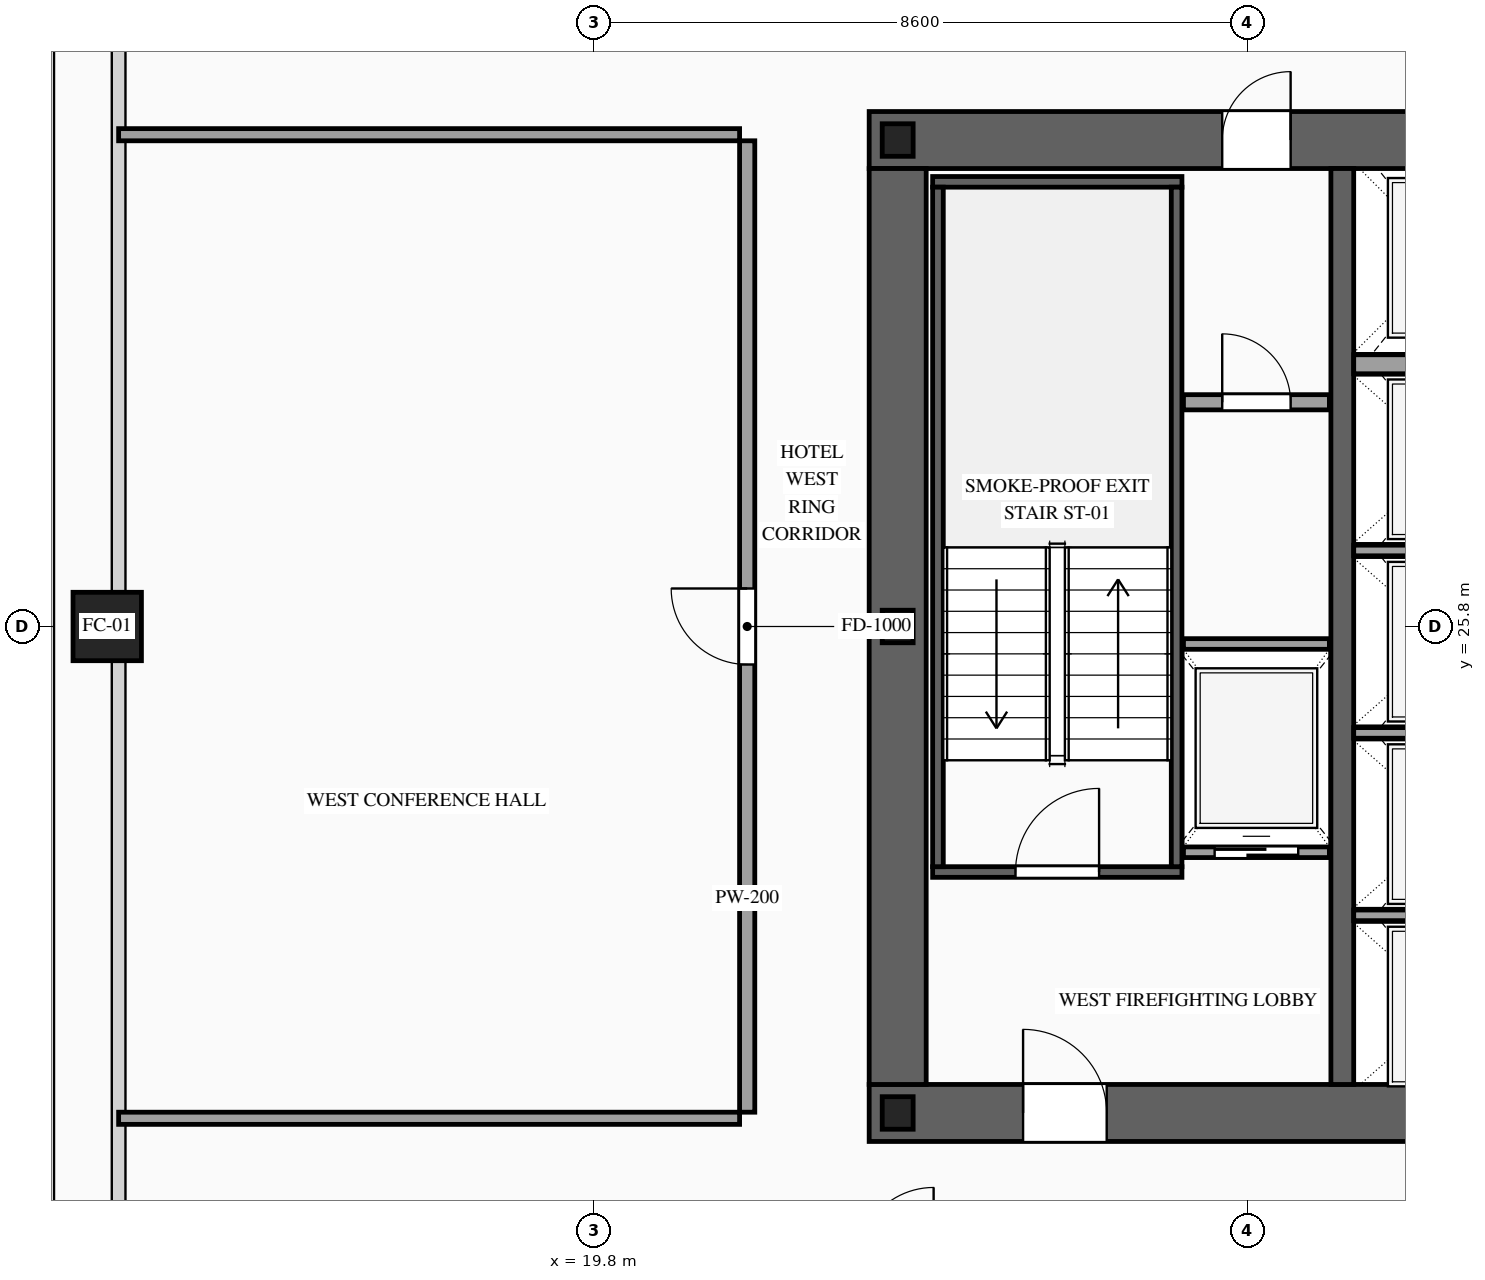
"""IFC4 building model, lengths in metres.
Left out: names, types, materials, properties, quantities, classifications, styles, units other than length and angle.
Written with IfcOpenShell. Run it as: python <this file> out.ifc"""

import sys

from ifc_helpers import new_model, si_unit, direction, frame, frame_2d, origin, origin_2d, place, context, subcontext, project, spatial, rectangle, hollow_rectangle, i_section, extrude, source, transform, mapped, element, fill, save


model = new_model("IFC4")
c1 = context("Model", 3, precision=1e-05, world=origin(), true_north=direction((0.0, 1.0)))
c2 = subcontext(c1, "Body", "Model", "MODEL_VIEW")
j1 = project(units=[si_unit("LENGTHUNIT", "METRE"), si_unit("PLANEANGLEUNIT", "RADIAN")], contexts=[c1])
p1 = place(None, origin())
s1 = spatial("IfcSite", under=j1, at=p1, CompositionType="ELEMENT")
p2 = place(p1, origin())
s2 = spatial("IfcBuilding", under=s1, at=p2, CompositionType="ELEMENT")
p3 = place(p2, frame((0.0, 0.0, 119.0)))
s3 = spatial("IfcBuildingStorey", under=s2, at=p3, CompositionType="ELEMENT", Elevation=119.0)
p4 = place(p3, frame((23.425, 19.4, 0.0), z_axis=(0.0, 0.0, 1.0), x_axis=(1.0, 0.0, 0.0)))
e1 = element("IfcWall", 1, at=p4, inside=s3, PredefinedType="SHEAR", context=c2, shape_type="SweptSolid", body=[
    extrude(rectangle(XDim=27.15, YDim=0.75, at=frame_2d((13.575, 0.0))), origin(), (0.0, 0.0, 1.0), 3.6),
])
p5 = place(p4, frame((2.025, 0.0, 0.0)))
e2 = element("IfcOpeningElement", 2, at=p5, cuts=e1, PredefinedType="OPENING", context=c2, shape_type="SweptSolid", body=[
    extrude(rectangle(XDim=1.1, YDim=2.2, at=frame_2d((0.55, 1.1))), frame((0.0, 0.39, 0.0), z_axis=(0.0, -1.0, 0.0), x_axis=(1.0, 0.0, 0.0)), (0.0, 0.0, 1.0), 0.78),
])
p6 = place(p4, frame((9.925, 0.0, 0.0)))
e3 = element("IfcOpeningElement", 3, at=p6, cuts=e1, PredefinedType="OPENING", context=c2, shape_type="SweptSolid", body=[
    extrude(rectangle(XDim=1.1, YDim=2.2, at=frame_2d((0.55, 1.1))), frame((0.0, 0.39, 0.0), z_axis=(0.0, -1.0, 0.0), x_axis=(1.0, 0.0, 0.0)), (0.0, 0.0, 1.0), 0.78),
])
p7 = place(p4, frame((23.125, 0.0, 0.0)))
e4 = element("IfcOpeningElement", 4, at=p7, cuts=e1, PredefinedType="OPENING", context=c2, shape_type="SweptSolid", body=[
    extrude(rectangle(XDim=1.1, YDim=2.2, at=frame_2d((0.55, 1.1))), frame((0.0, 0.39, 0.0), z_axis=(0.0, -1.0, 0.0), x_axis=(1.0, 0.0, 0.0)), (0.0, 0.0, 1.0), 0.78),
])
p8 = place(p4, frame((19.745, 0.0, 0.0)))
e5 = element("IfcOpeningElement", 5, at=p8, cuts=e1, PredefinedType="OPENING", context=c2, shape_type="SweptSolid", body=[
    extrude(rectangle(XDim=0.9, YDim=2.15, at=frame_2d((0.45, 1.075))), frame((0.0, 0.39, 0.0), z_axis=(0.0, -1.0, 0.0), x_axis=(1.0, 0.0, 0.0)), (0.0, 0.0, 1.0), 0.78),
])
p9 = place(p4, frame((18.305, 0.0, 0.0)))
e6 = element("IfcOpeningElement", 6, at=p9, cuts=e1, PredefinedType="OPENING", context=c2, shape_type="SweptSolid", body=[
    extrude(rectangle(XDim=0.9, YDim=2.15, at=frame_2d((0.45, 1.075))), frame((0.0, 0.39, 0.0), z_axis=(0.0, -1.0, 0.0), x_axis=(1.0, 0.0, 0.0)), (0.0, 0.0, 1.0), 0.78),
])
p10 = place(p3, frame((23.425, 32.2, 0.0), z_axis=(0.0, 0.0, 1.0), x_axis=(1.0, 0.0, 0.0)))
e7 = element("IfcWall", 7, at=p10, inside=s3, PredefinedType="SHEAR", context=c2, shape_type="SweptSolid", body=[
    extrude(rectangle(XDim=27.15, YDim=0.75, at=frame_2d((13.575, 0.0))), origin(), (0.0, 0.0, 1.0), 3.6),
])
p11 = place(p10, frame((4.645, 0.0, 0.0)))
e8 = element("IfcOpeningElement", 8, at=p11, cuts=e7, PredefinedType="OPENING", context=c2, shape_type="SweptSolid", body=[
    extrude(rectangle(XDim=0.9, YDim=2.15, at=frame_2d((0.45, 1.075))), frame((0.0, 0.39, 0.0), z_axis=(0.0, -1.0, 0.0), x_axis=(1.0, 0.0, 0.0)), (0.0, 0.0, 1.0), 0.78),
])
p12 = place(p10, frame((9.925, 0.0, 0.0)))
e9 = element("IfcOpeningElement", 9, at=p12, cuts=e7, PredefinedType="OPENING", context=c2, shape_type="SweptSolid", body=[
    extrude(rectangle(XDim=1.1, YDim=2.2, at=frame_2d((0.55, 1.1))), frame((0.0, 0.39, 0.0), z_axis=(0.0, -1.0, 0.0), x_axis=(1.0, 0.0, 0.0)), (0.0, 0.0, 1.0), 0.78),
])
p13 = place(p10, frame((15.775, 0.0, 0.0)))
e10 = element("IfcOpeningElement", 10, at=p13, cuts=e7, PredefinedType="OPENING", context=c2, shape_type="SweptSolid", body=[
    extrude(rectangle(XDim=1.1, YDim=2.2, at=frame_2d((0.55, 1.1))), frame((0.0, 0.39, 0.0), z_axis=(0.0, -1.0, 0.0), x_axis=(1.0, 0.0, 0.0)), (0.0, 0.0, 1.0), 0.78),
])
p14 = place(p10, frame((18.305, 0.0, 0.0)))
e11 = element("IfcOpeningElement", 11, at=p14, cuts=e7, PredefinedType="OPENING", context=c2, shape_type="SweptSolid", body=[
    extrude(rectangle(XDim=0.9, YDim=2.15, at=frame_2d((0.45, 1.075))), frame((0.0, 0.39, 0.0), z_axis=(0.0, -1.0, 0.0), x_axis=(1.0, 0.0, 0.0)), (0.0, 0.0, 1.0), 0.78),
])
p15 = place(p10, frame((19.745, 0.0, 0.0)))
e12 = element("IfcOpeningElement", 12, at=p15, cuts=e7, PredefinedType="OPENING", context=c2, shape_type="SweptSolid", body=[
    extrude(rectangle(XDim=0.9, YDim=2.15, at=frame_2d((0.45, 1.075))), frame((0.0, 0.39, 0.0), z_axis=(0.0, -1.0, 0.0), x_axis=(1.0, 0.0, 0.0)), (0.0, 0.0, 1.0), 0.78),
])
m1 = source(origin(), c2, "Body", "SweptSolid", [
    extrude(rectangle(XDim=12.05, YDim=0.75, at=frame_2d((6.025, 0.0))), origin(), (0.0, 0.0, 1.0), 3.6),
])
p16 = place(p3, frame((23.8, 19.775, 0.0), z_axis=(0.0, 0.0, 1.0), x_axis=(0.0, 1.0, 0.0)))
e13 = element("IfcWall", 13, at=p16, inside=s3, PredefinedType="SHEAR", context=c2, shape_type="MappedRepresentation", body=[
    mapped(m1, transform((0.0, 0.0, 0.0), scale=1.0)),
])
m2 = source(origin(), c2, "Body", "SweptSolid", [
    extrude(rectangle(XDim=12.05, YDim=0.3, at=frame_2d((6.025, 0.0))), origin(), (0.0, 0.0, 1.0), 3.6),
])
p17 = place(p3, frame((29.65, 19.775, 0.0), z_axis=(0.0, 0.0, 1.0), x_axis=(0.0, 1.0, 0.0)))
e14 = element("IfcWall", 14, at=p17, inside=s3, PredefinedType="SOLIDWALL", context=c2, shape_type="MappedRepresentation", body=[
    mapped(m2, transform((0.0, 0.0, 0.0), scale=1.0)),
])
m3 = source(origin(), c2, "Body", "SweptSolid", [
    extrude(i_section(OverallWidth=0.407, OverallDepth=0.428, WebThickness=0.02, FlangeThickness=0.035, at=origin_2d()), origin(), (0.0, 0.0, 1.0), 3.6),
])
for number, where, z_axis, x_axis in (
    (15, (23.8, 19.4, 0.0), (0.0, 0.0, 1.0), (1.0, 0.0, 0.0)),
    (16, (23.8, 25.8, 0.0), (0.0, 0.0, 1.0), (1.0, 0.0, 0.0)),
    (17, (23.8, 32.2, 0.0), (0.0, 0.0, 1.0), (1.0, 0.0, 0.0)),
):
    element("IfcColumn", number, at=place(p3, frame(where, z_axis=z_axis, x_axis=x_axis)), inside=s3, PredefinedType="COLUMN", context=c2, shape_type="MappedRepresentation", body=[
        mapped(m3, transform((0.0, 0.0, 0.0), scale=1.0)),
    ])
m4 = source(origin(), c2, "Body", "SweptSolid", [
    extrude(hollow_rectangle(XDim=0.9, YDim=0.9, WallThickness=0.042, at=origin_2d()), origin(), (0.0, 0.0, 1.0), 3.6),
])
p18 = place(p3, frame((13.4, 25.8, 0.0), z_axis=(0.0, 0.0, 1.0), x_axis=(1.0, 0.0, 0.0)))
e18 = element("IfcColumn", 18, at=p18, inside=s3, PredefinedType="COLUMN", context=c2, shape_type="MappedRepresentation", body=[
    mapped(m4, transform((0.0, 0.0, 0.0), scale=1.0)),
])
p19 = place(p3, frame((27.56, 22.83, 0.0), z_axis=(0.0, 0.0, 1.0), x_axis=(1.0, 0.0, 0.0)))
e19 = element("IfcWall", 19, at=p19, inside=s3, PredefinedType="SOLIDWALL", context=c2, shape_type="SweptSolid", body=[
    extrude(rectangle(XDim=1.92, YDim=0.14, at=frame_2d((0.96, 0.0))), origin(), (0.0, 0.0, 1.0), 3.38),
])
p20 = place(p19, frame((0.41, 0.0, 0.0)))
e20 = element("IfcOpeningElement", 20, at=p20, cuts=e19, PredefinedType="OPENING", context=c2, shape_type="SweptSolid", body=[
    extrude(rectangle(XDim=1.1, YDim=2.2, at=frame_2d((0.55, 1.1))), frame((0.0, 0.085, 0.0), z_axis=(0.0, -1.0, 0.0), x_axis=(1.0, 0.0, 0.0)), (0.0, 0.0, 1.0), 0.17),
])
m5 = source(origin(), c2, "Body", "SweptSolid", [
    extrude(rectangle(XDim=1.92, YDim=0.14, at=frame_2d((0.96, 0.0))), origin(), (0.0, 0.0, 1.0), 3.38),
])
p21 = place(p3, frame((27.56, 25.57, 0.0), z_axis=(0.0, 0.0, 1.0), x_axis=(1.0, 0.0, 0.0)))
e21 = element("IfcWall", 21, at=p21, inside=s3, PredefinedType="SOLIDWALL", context=c2, shape_type="MappedRepresentation", body=[
    mapped(m5, transform((0.0, 0.0, 0.0), scale=1.0)),
])
m6 = source(origin(), c2, "Body", "SweptSolid", [
    extrude(rectangle(XDim=2.5, YDim=0.14, at=frame_2d((1.25, 0.0))), origin(), (0.0, 0.0, 1.0), 3.38),
])
for number, where, z_axis, x_axis in (
    (22, (29.8, 22.0, 0.0), (0.0, 0.0, 1.0), (1.0, 0.0, 0.0)),
    (23, (29.8, 24.4, 0.0), (0.0, 0.0, 1.0), (1.0, 0.0, 0.0)),
    (24, (29.8, 26.8, 0.0), (0.0, 0.0, 1.0), (1.0, 0.0, 0.0)),
):
    element("IfcWall", number, at=place(p3, frame(where, z_axis=z_axis, x_axis=x_axis)), inside=s3, PredefinedType="SOLIDWALL", context=c2, shape_type="MappedRepresentation", body=[
        mapped(m6, transform((0.0, 0.0, 0.0), scale=1.0)),
    ])
m7 = source(origin(), c2, "Body", "SweptSolid", [
    extrude(rectangle(XDim=2.5, YDim=0.25, at=frame_2d((1.25, 0.0))), origin(), (0.0, 0.0, 1.0), 3.38),
])
p22 = place(p3, frame((29.8, 29.25, 0.0), z_axis=(0.0, 0.0, 1.0), x_axis=(1.0, 0.0, 0.0)))
e25 = element("IfcWall", 25, at=p22, inside=s3, PredefinedType="SOLIDWALL", context=c2, shape_type="MappedRepresentation", body=[
    mapped(m7, transform((0.0, 0.0, 0.0), scale=1.0)),
])
p23 = place(p3, frame((24.26, 22.57, 0.0), z_axis=(0.0, 0.0, 1.0), x_axis=(1.0, 0.0, 0.0)))
e26 = element("IfcWall", 26, at=p23, inside=s3, PredefinedType="SOLIDWALL", context=c2, shape_type="SweptSolid", body=[
    extrude(rectangle(XDim=3.28, YDim=0.14, at=frame_2d((1.64, 0.0))), origin(), (0.0, 0.0, 1.0), 3.38),
])
p24 = place(p23, frame((1.09, 0.0, 0.0)))
e27 = element("IfcOpeningElement", 27, at=p24, cuts=e26, PredefinedType="OPENING", context=c2, shape_type="SweptSolid", body=[
    extrude(rectangle(XDim=1.1, YDim=2.2, at=frame_2d((0.55, 1.1))), frame((0.0, 0.085, 0.0), z_axis=(0.0, -1.0, 0.0), x_axis=(1.0, 0.0, 0.0)), (0.0, 0.0, 1.0), 0.17),
])
m8 = source(origin(), c2, "Body", "SweptSolid", [
    extrude(rectangle(XDim=3.28, YDim=0.14, at=frame_2d((1.64, 0.0))), origin(), (0.0, 0.0, 1.0), 3.38),
])
p25 = place(p3, frame((24.26, 31.65, 0.0), z_axis=(0.0, 0.0, 1.0), x_axis=(1.0, 0.0, 0.0)))
e28 = element("IfcWall", 28, at=p25, inside=s3, PredefinedType="SOLIDWALL", context=c2, shape_type="MappedRepresentation", body=[
    mapped(m8, transform((0.0, 0.0, 0.0), scale=1.0)),
])
m9 = source(origin(), c2, "Body", "SweptSolid", [
    extrude(rectangle(XDim=8.94, YDim=0.14, at=frame_2d((4.47, 0.0))), origin(), (0.0, 0.0, 1.0), 3.38),
])
for number, where, z_axis, x_axis in (
    (29, (24.33, 22.64, 0.0), (0.0, 0.0, 1.0), (0.0, 1.0, 0.0)),
    (30, (27.47, 22.64, 0.0), (0.0, 0.0, 1.0), (0.0, 1.0, 0.0)),
):
    element("IfcWall", number, at=place(p3, frame(where, z_axis=z_axis, x_axis=x_axis)), inside=s3, PredefinedType="SOLIDWALL", context=c2, shape_type="MappedRepresentation", body=[
        mapped(m9, transform((0.0, 0.0, 0.0), scale=1.0)),
    ])
p26 = place(p3, frame((27.56, 28.75, 0.0), z_axis=(0.0, 0.0, 1.0), x_axis=(1.0, 0.0, 0.0)))
e31 = element("IfcWall", 31, at=p26, inside=s3, PredefinedType="PARTITIONING", context=c2, shape_type="SweptSolid", body=[
    extrude(rectangle(XDim=1.92, YDim=0.2, at=frame_2d((0.96, 0.0))), origin(), (0.0, 0.0, 1.0), 3.38),
])
p27 = place(p26, frame((0.51, 0.0, 0.0)))
e32 = element("IfcOpeningElement", 32, at=p27, cuts=e31, PredefinedType="OPENING", context=c2, shape_type="SweptSolid", body=[
    extrude(rectangle(XDim=0.9, YDim=2.15, at=frame_2d((0.45, 1.075))), frame((0.0, 0.115, 0.0), z_axis=(0.0, -1.0, 0.0), x_axis=(1.0, 0.0, 0.0)), (0.0, 0.0, 1.0), 0.23),
])
p28 = place(p3, frame((21.82, 19.41, 0.0), z_axis=(0.0, 0.0, 1.0), x_axis=(0.0, 1.0, 0.0)))
e33 = element("IfcWall", 33, at=p28, inside=s3, PredefinedType="PARTITIONING", context=c2, shape_type="SweptSolid", body=[
    extrude(rectangle(XDim=12.78, YDim=0.2, at=frame_2d((6.39, 0.0))), origin(), (0.0, 0.0, 1.0), 3.38),
])
p29 = place(p28, frame((5.89, 0.0, 0.0)))
e34 = element("IfcOpeningElement", 34, at=p29, cuts=e33, PredefinedType="OPENING", context=c2, shape_type="SweptSolid", body=[
    extrude(rectangle(XDim=1.0, YDim=2.2, at=frame_2d((0.5, 1.1))), frame((0.0, 0.115, 0.0), z_axis=(0.0, -1.0, 0.0), x_axis=(1.0, 0.0, 0.0)), (0.0, 0.0, 1.0), 0.23),
])
m10 = source(origin(), c2, "Body", "SweptSolid", [
    extrude(rectangle(XDim=8.17, YDim=0.16, at=frame_2d((4.085, 0.0))), origin(), (0.0, 0.0, 1.0), 2.875),
])
for number, where, z_axis, x_axis in (
    (35, (13.55, 19.33, 0.0), (0.0, 0.0, 1.0), (1.0, 0.0, 0.0)),
    (36, (13.55, 32.27, 0.0), (0.0, 0.0, 1.0), (1.0, 0.0, 0.0)),
):
    element("IfcWall", number, at=place(p3, frame(where, z_axis=z_axis, x_axis=x_axis)), inside=s3, PredefinedType="PARTITIONING", context=c2, shape_type="MappedRepresentation", body=[
        mapped(m10, transform((0.0, 0.0, 0.0), scale=1.0)),
    ])
m11 = source(origin(), c2, "Body", "SweptSolid", [
    extrude(rectangle(XDim=1.1, YDim=2.2, at=frame_2d((0.55, 1.1))), frame((0.0, 0.025, 0.0), z_axis=(0.0, -1.0, 0.0), x_axis=(1.0, 0.0, 0.0)), (0.0, 0.0, 1.0), 0.05),
])
p30 = place(p20, origin())
e37 = element("IfcDoor", 37, at=p30, inside=s3, OperationType="SLIDING_TO_LEFT", PredefinedType="DOOR", context=c2, shape_type="MappedRepresentation", body=[
    mapped(m11, transform((0.0, 0.0, 0.0), scale=1.0)),
])
fill(e20, e37)
m12 = source(origin(), c2, "Body", "SweptSolid", [
    extrude(rectangle(XDim=1.1, YDim=2.2, at=frame_2d((0.55, 1.1))), frame((0.0, 0.025, 0.0), z_axis=(0.0, -1.0, 0.0), x_axis=(1.0, 0.0, 0.0)), (0.0, 0.0, 1.0), 0.05),
])
p31 = place(p24, origin())
e38 = element("IfcDoor", 38, at=p31, inside=s3, OperationType="SINGLE_SWING_RIGHT", PredefinedType="DOOR", context=c2, shape_type="MappedRepresentation", body=[
    mapped(m12, transform((0.0, 0.0, 0.0), scale=1.0)),
])
fill(e27, e38)
p32 = place(p5, origin())
e39 = element("IfcDoor", 39, at=p32, inside=s3, OperationType="SINGLE_SWING_LEFT", PredefinedType="DOOR", context=c2, shape_type="MappedRepresentation", body=[
    mapped(m12, transform((0.0, 0.0, 0.0), scale=1.0)),
])
fill(e2, e39)
m13 = source(origin(), c2, "Body", "SweptSolid", [
    extrude(rectangle(XDim=0.9, YDim=2.15, at=frame_2d((0.45, 1.075))), frame((0.0, 0.025, 0.0), z_axis=(0.0, -1.0, 0.0), x_axis=(1.0, 0.0, 0.0)), (0.0, 0.0, 1.0), 0.05),
])
p33 = place(p11, origin())
e40 = element("IfcDoor", 40, at=p33, inside=s3, OperationType="SINGLE_SWING_RIGHT", PredefinedType="DOOR", context=c2, shape_type="MappedRepresentation", body=[
    mapped(m13, transform((0.0, 0.0, 0.0), scale=1.0)),
])
fill(e8, e40)
p34 = place(p27, origin())
e41 = element("IfcDoor", 41, at=p34, inside=s3, OperationType="SINGLE_SWING_LEFT", PredefinedType="DOOR", context=c2, shape_type="MappedRepresentation", body=[
    mapped(m13, transform((0.0, 0.0, 0.0), scale=1.0)),
])
fill(e32, e41)
m14 = source(origin(), c2, "Body", "SweptSolid", [
    extrude(rectangle(XDim=1.0, YDim=2.2, at=frame_2d((0.5, 1.1))), frame((0.0, 0.025, 0.0), z_axis=(0.0, -1.0, 0.0), x_axis=(1.0, 0.0, 0.0)), (0.0, 0.0, 1.0), 0.05),
])
p35 = place(p29, origin())
e42 = element("IfcDoor", 42, at=p35, inside=s3, OperationType="SINGLE_SWING_RIGHT", PredefinedType="DOOR", context=c2, shape_type="MappedRepresentation", body=[
    mapped(m14, transform((0.0, 0.0, 0.0), scale=1.0)),
])
fill(e34, e42)
save(model, sys.argv[1])
